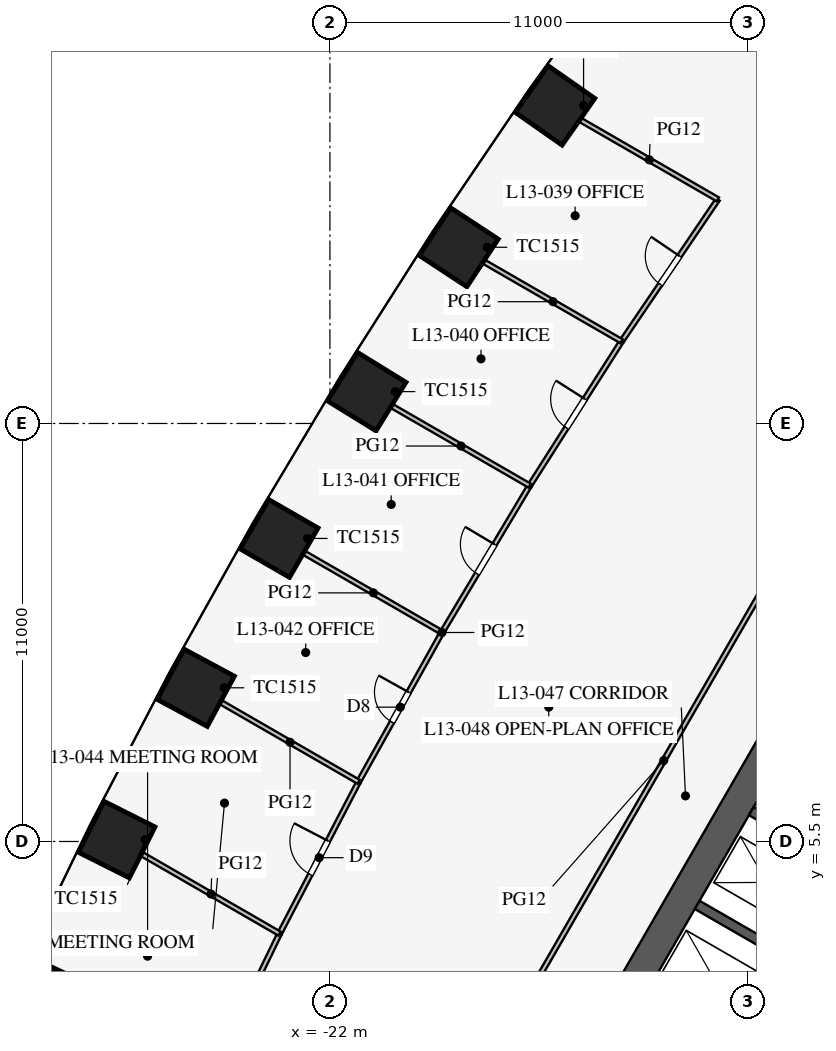
"""IFC4 building model, lengths in metres.
Left out: names, types, materials, properties, quantities, classifications, styles, units other than length and angle.
Written with IfcOpenShell. Run it as: python <this file> out.ifc"""

import sys

from ifc_helpers import new_model, si_unit, direction, frame, frame_2d, origin, origin_2d, place, context, subcontext, project, spatial, rectangle, extrude, element, fill, save


model = new_model("IFC4")
c1 = context("Model", 3, precision=1e-05, world=origin(), true_north=direction((0.0, 1.0)))
c2 = subcontext(c1, "Body", "Model", "MODEL_VIEW")
j1 = project(units=[si_unit("LENGTHUNIT", "METRE"), si_unit("PLANEANGLEUNIT", "RADIAN")], contexts=[c1])
p1 = place(None, origin())
s1 = spatial("IfcSite", under=j1, at=p1, CompositionType="ELEMENT")
p2 = place(p1, origin())
s2 = spatial("IfcBuilding", under=s1, at=p2, CompositionType="ELEMENT")
p3 = place(p2, frame((0.0, 0.0, 58.5)))
s3 = spatial("IfcBuildingStorey", under=s2, at=p3, CompositionType="ELEMENT", Elevation=58.5)
for number, where, z_axis, x_axis in (
    (1, (-16.076, 24.87, 0.0), (0.0, 0.0, 1.0), (-0.574, -0.819, 0.0)),
    (2, (-18.611, 21.137, 0.0), (0.0, 0.0, 1.0), (-0.549, -0.836, 0.0)),
    (3, (-21.031, 17.339, 0.0), (0.0, 0.0, 1.0), (-0.525, -0.851, 0.0)),
    (4, (-23.338, 13.474, 0.0), (0.0, 0.0, 1.0), (-0.5, -0.866, 0.0)),
    (5, (-25.531, 9.544, 0.0), (0.0, 0.0, 1.0), (-0.475, -0.88, 0.0)),
    (6, (-27.611, 5.549, 0.0), (0.0, 0.0, 1.0), (-0.449, -0.894, 0.0)),
    (7, (-29.576, 1.487, 0.0), (0.0, 0.0, 1.0), (-0.423, -0.906, 0.0)),
):
    element("IfcColumn", number, at=place(p3, frame(where, z_axis=z_axis, x_axis=x_axis)), inside=s3, PredefinedType="COLUMN", context=c2, shape_type="SweptSolid", body=[
        extrude(rectangle(XDim=1.5, YDim=1.5, at=origin_2d()), origin(), (0.0, 0.0, 1.0), 4.2),
    ])
p4 = place(p3, frame((-5.773, 16.0, 0.0), z_axis=(0.0, 0.0, 1.0), x_axis=(-0.500002442456, -0.866023993627, 0.0)))
e8 = element("IfcWall", 8, at=p4, inside=s3, PredefinedType="SHEAR", context=c2, shape_type="SweptSolid", body=[
    extrude(rectangle(XDim=21.939, YDim=0.8, at=frame_2d((10.97, 0.0))), origin(), (0.0, 0.0, 1.0), 4.2),
])
p5 = place(p4, frame((17.27, 0.0, 0.0)))
e9 = element("IfcOpeningElement", 9, at=p5, cuts=e8, PredefinedType="OPENING", context=c2, shape_type="SweptSolid", body=[
    extrude(rectangle(XDim=1.2, YDim=2.1, at=frame_2d((0.6, 1.05))), frame((0.0, 0.41, 0.0), z_axis=(0.0, -1.0, 0.0), x_axis=(1.0, 0.0, 0.0)), (0.0, 0.0, 1.0), 0.82),
])
p6 = place(p4, frame((3.47, 0.0, 0.0)))
e10 = element("IfcOpeningElement", 10, at=p6, cuts=e8, PredefinedType="OPENING", context=c2, shape_type="SweptSolid", body=[
    extrude(rectangle(XDim=1.2, YDim=2.1, at=frame_2d((0.6, 1.05))), frame((0.0, 0.41, 0.0), z_axis=(0.0, -1.0, 0.0), x_axis=(1.0, 0.0, 0.0)), (0.0, 0.0, 1.0), 0.82),
])
p7 = place(p3, frame((-5.724, 9.886, 0.0), z_axis=(0.0, 0.0, 1.0), x_axis=(-0.500001763848, -0.866024385424, 0.0)))
e11 = element("IfcWall", 11, at=p7, inside=s3, PredefinedType="SHEAR", context=c2, shape_type="SweptSolid", body=[
    extrude(rectangle(XDim=11.4, YDim=0.25, at=frame_2d((5.7, 0.0))), origin(), (0.0, 0.0, 1.0), 4.2),
])
p8 = place(p7, frame((6.525, 0.0, 0.0)))
e12 = element("IfcOpeningElement", 12, at=p8, cuts=e11, PredefinedType="OPENING", context=c2, shape_type="SweptSolid", body=[
    extrude(rectangle(XDim=1.2, YDim=2.2, at=frame_2d((0.6, 1.1))), frame((0.0, 0.135, 0.0), z_axis=(0.0, -1.0, 0.0), x_axis=(1.0, 0.0, 0.0)), (0.0, 0.0, 1.0), 0.27),
])
p9 = place(p7, frame((9.375, 0.0, 0.0)))
e13 = element("IfcOpeningElement", 13, at=p9, cuts=e11, PredefinedType="OPENING", context=c2, shape_type="SweptSolid", body=[
    extrude(rectangle(XDim=1.2, YDim=2.2, at=frame_2d((0.6, 1.1))), frame((0.0, 0.135, 0.0), z_axis=(0.0, -1.0, 0.0), x_axis=(1.0, 0.0, 0.0)), (0.0, 0.0, 1.0), 0.27),
])
for number, where, z_axis, x_axis in (
    (14, (-8.682, 5.012, 0.0), (0.0, 0.0, 1.0), (-0.866, 0.5, 0.0)),
    (15, (-10.107, 2.544, 0.0), (0.0, 0.0, 1.0), (-0.866, 0.5, 0.0)),
):
    element("IfcWall", number, at=place(p3, frame(where, z_axis=z_axis, x_axis=x_axis)), inside=s3, PredefinedType="SHEAR", context=c2, shape_type="SweptSolid", body=[
        extrude(rectangle(XDim=2.575, YDim=0.25, at=frame_2d((1.288, 0.0))), origin(), (0.0, 0.0, 1.0), 4.2),
    ])
p10 = place(p3, frame((-0.016, 30.491, 0.0), z_axis=(0.0, 0.0, 1.0), x_axis=(-0.50000091641, -0.866024874695, 0.0)))
e16 = element("IfcWall", 16, at=p10, inside=s3, PredefinedType="PARTITIONING", context=c2, shape_type="SweptSolid", body=[
    extrude(rectangle(XDim=52.796, YDim=0.12, at=frame_2d((26.398, 0.0))), origin(), (0.0, 0.0, 1.0), 2.9),
])
p11 = place(p10, frame((10.2, 0.0, 0.15)))
e17 = element("IfcOpeningElement", 17, at=p11, cuts=e16, PredefinedType="OPENING", context=c2, shape_type="SweptSolid", body=[
    extrude(rectangle(XDim=1.8, YDim=2.1, at=frame_2d((0.9, 1.05))), frame((0.0, 0.07, 0.0), z_axis=(0.0, -1.0, 0.0), x_axis=(1.0, 0.0, 0.0)), (0.0, 0.0, 1.0), 0.14),
])
p12 = place(p10, frame((40.8, 0.0, 0.15)))
e18 = element("IfcOpeningElement", 18, at=p12, cuts=e16, PredefinedType="OPENING", context=c2, shape_type="SweptSolid", body=[
    extrude(rectangle(XDim=1.8, YDim=2.1, at=frame_2d((0.9, 1.05))), frame((0.0, 0.07, 0.0), z_axis=(0.0, -1.0, 0.0), x_axis=(1.0, 0.0, 0.0)), (0.0, 0.0, 1.0), 0.14),
])
p13 = place(p3, frame((-19.052, 10.999, 0.0), z_axis=(0.0, 0.0, 1.0), x_axis=(-0.487373854787, -0.873193406795, 0.0)))
e19 = element("IfcWall", 19, at=p13, inside=s3, PredefinedType="PARTITIONING", context=c2, shape_type="SweptSolid", body=[
    extrude(rectangle(XDim=4.5, YDim=0.12, at=frame_2d((2.25, 0.0))), origin(), (0.0, 0.0, 1.0), 2.9),
])
p14 = place(p13, frame((1.8, 0.0, 0.15)))
e20 = element("IfcOpeningElement", 20, at=p14, cuts=e19, PredefinedType="OPENING", context=c2, shape_type="SweptSolid", body=[
    extrude(rectangle(XDim=0.9, YDim=2.1, at=frame_2d((0.45, 1.05))), frame((0.0, 0.07, 0.0), z_axis=(0.0, -1.0, 0.0), x_axis=(1.0, 0.0, 0.0)), (0.0, 0.0, 1.0), 0.14),
])
p15 = place(p3, frame((-21.245, 7.07, 0.0), z_axis=(0.0, 0.0, 1.0), x_axis=(-0.461852697957, -0.886956642339, 0.0)))
e21 = element("IfcWall", 21, at=p15, inside=s3, PredefinedType="PARTITIONING", context=c2, shape_type="SweptSolid", body=[
    extrude(rectangle(XDim=4.504, YDim=0.12, at=frame_2d((2.252, 0.0))), origin(), (0.0, 0.0, 1.0), 2.9),
])
p16 = place(p15, frame((1.75, 0.0, 0.15)))
e22 = element("IfcOpeningElement", 22, at=p16, cuts=e21, PredefinedType="OPENING", context=c2, shape_type="SweptSolid", body=[
    extrude(rectangle(XDim=1.0, YDim=2.1, at=frame_2d((0.5, 1.05))), frame((0.0, 0.07, 0.0), z_axis=(0.0, -1.0, 0.0), x_axis=(1.0, 0.0, 0.0)), (0.0, 0.0, 1.0), 0.14),
])
p17 = place(p3, frame((-23.325, 3.074, 0.0), z_axis=(0.0, 0.0, 1.0), x_axis=(-0.435857917556, -0.900015486369, 0.0)))
e23 = element("IfcWall", 23, at=p17, inside=s3, PredefinedType="PARTITIONING", context=c2, shape_type="SweptSolid", body=[
    extrude(rectangle(XDim=4.512, YDim=0.12, at=frame_2d((2.256, 0.0))), origin(), (0.0, 0.0, 1.0), 2.9),
])
p18 = place(p17, frame((1.75, 0.0, 0.15)))
e24 = element("IfcOpeningElement", 24, at=p18, cuts=e23, PredefinedType="OPENING", context=c2, shape_type="SweptSolid", body=[
    extrude(rectangle(XDim=1.0, YDim=2.1, at=frame_2d((0.5, 1.05))), frame((0.0, 0.07, 0.0), z_axis=(0.0, -1.0, 0.0), x_axis=(1.0, 0.0, 0.0)), (0.0, 0.0, 1.0), 0.14),
])
p19 = place(p3, frame((-11.792, 22.396, 0.0), z_axis=(0.0, 0.0, 1.0), x_axis=(-0.561512004239, -0.827468591002, 0.0)))
e25 = element("IfcWall", 25, at=p19, inside=s3, PredefinedType="PARTITIONING", context=c2, shape_type="SweptSolid", body=[
    extrude(rectangle(XDim=4.512, YDim=0.12, at=frame_2d((2.256, 0.0))), origin(), (0.0, 0.0, 1.0), 2.9),
])
p20 = place(p19, frame((1.8, 0.0, 0.15)))
e26 = element("IfcOpeningElement", 26, at=p20, cuts=e25, PredefinedType="OPENING", context=c2, shape_type="SweptSolid", body=[
    extrude(rectangle(XDim=0.9, YDim=2.1, at=frame_2d((0.45, 1.05))), frame((0.0, 0.07, 0.0), z_axis=(0.0, -1.0, 0.0), x_axis=(1.0, 0.0, 0.0)), (0.0, 0.0, 1.0), 0.14),
])
p21 = place(p3, frame((-16.745, 14.864, 0.0), z_axis=(0.0, 0.0, 1.0), x_axis=(-0.51252396108, -0.858672923364, 0.0)))
e27 = element("IfcWall", 27, at=p21, inside=s3, PredefinedType="PARTITIONING", context=c2, shape_type="SweptSolid", body=[
    extrude(rectangle(XDim=4.5, YDim=0.12, at=frame_2d((2.25, 0.0))), origin(), (0.0, 0.0, 1.0), 2.9),
])
p22 = place(p21, frame((1.8, 0.0, 0.15)))
e28 = element("IfcOpeningElement", 28, at=p22, cuts=e27, PredefinedType="OPENING", context=c2, shape_type="SweptSolid", body=[
    extrude(rectangle(XDim=0.9, YDim=2.1, at=frame_2d((0.45, 1.05))), frame((0.0, 0.07, 0.0), z_axis=(0.0, -1.0, 0.0), x_axis=(1.0, 0.0, 0.0)), (0.0, 0.0, 1.0), 0.14),
])
p23 = place(p3, frame((-14.325, 18.663, 0.0), z_axis=(0.0, 0.0, 1.0), x_axis=(-0.537205132487, -0.843451626135, 0.0)))
e29 = element("IfcWall", 29, at=p23, inside=s3, PredefinedType="PARTITIONING", context=c2, shape_type="SweptSolid", body=[
    extrude(rectangle(XDim=4.504, YDim=0.12, at=frame_2d((2.252, 0.0))), origin(), (0.0, 0.0, 1.0), 2.9),
])
p24 = place(p23, frame((1.8, 0.0, 0.15)))
e30 = element("IfcOpeningElement", 30, at=p24, cuts=e29, PredefinedType="OPENING", context=c2, shape_type="SweptSolid", body=[
    extrude(rectangle(XDim=0.9, YDim=2.1, at=frame_2d((0.45, 1.05))), frame((0.0, 0.07, 0.0), z_axis=(0.0, -1.0, 0.0), x_axis=(1.0, 0.0, 0.0)), (0.0, 0.0, 1.0), 0.14),
])
p25 = place(p3, frame((-19.052, 10.999, 0.0), z_axis=(0.0, 0.0, 1.0), x_axis=(-0.866004239599, 0.500036655653, 0.0)))
e31 = element("IfcWall", 31, at=p25, inside=s3, PredefinedType="PARTITIONING", context=c2, shape_type="SweptSolid", body=[
    extrude(rectangle(XDim=4.17, YDim=0.12, at=frame_2d((2.085, 0.0))), origin(), (0.0, 0.0, 1.0), 2.8),
])
p26 = place(p3, frame((-21.245, 7.07, 0.0), z_axis=(0.0, 0.0, 1.0), x_axis=(-0.866025669538, 0.499999539701, 0.0)))
e32 = element("IfcWall", 32, at=p26, inside=s3, PredefinedType="PARTITIONING", context=c2, shape_type="SweptSolid", body=[
    extrude(rectangle(XDim=4.169, YDim=0.12, at=frame_2d((2.085, 0.0))), origin(), (0.0, 0.0, 1.0), 2.8),
])
p27 = place(p3, frame((-23.325, 3.074, 0.0), z_axis=(0.0, 0.0, 1.0), x_axis=(-0.866009971343, 0.50002672882, 0.0)))
e33 = element("IfcWall", 33, at=p27, inside=s3, PredefinedType="PARTITIONING", context=c2, shape_type="SweptSolid", body=[
    extrude(rectangle(XDim=4.167, YDim=0.12, at=frame_2d((2.083, 0.0))), origin(), (0.0, 0.0, 1.0), 2.8),
])
p28 = place(p3, frame((-11.792, 22.396, 0.0), z_axis=(0.0, 0.0, 1.0), x_axis=(-0.866011781705, 0.500023593391, 0.0)))
e34 = element("IfcWall", 34, at=p28, inside=s3, PredefinedType="PARTITIONING", context=c2, shape_type="SweptSolid", body=[
    extrude(rectangle(XDim=4.164, YDim=0.12, at=frame_2d((2.082, 0.0))), origin(), (0.0, 0.0, 1.0), 2.6),
])
p29 = place(p3, frame((-16.745, 14.864, 0.0), z_axis=(0.0, 0.0, 1.0), x_axis=(-0.866025669538, 0.499999539701, 0.0)))
e35 = element("IfcWall", 35, at=p29, inside=s3, PredefinedType="PARTITIONING", context=c2, shape_type="SweptSolid", body=[
    extrude(rectangle(XDim=4.169, YDim=0.12, at=frame_2d((2.085, 0.0))), origin(), (0.0, 0.0, 1.0), 2.8),
])
p30 = place(p3, frame((-14.325, 18.663, 0.0), z_axis=(0.0, 0.0, 1.0), x_axis=(-0.866009971343, 0.50002672882, 0.0)))
e36 = element("IfcWall", 36, at=p30, inside=s3, PredefinedType="PARTITIONING", context=c2, shape_type="SweptSolid", body=[
    extrude(rectangle(XDim=4.167, YDim=0.12, at=frame_2d((2.083, 0.0))), origin(), (0.0, 0.0, 1.0), 2.8),
])
p31 = place(p20, frame((0.9, 0.0, 0.0), z_axis=(0.0, 0.0, 1.0), x_axis=(-1.0, 0.0, 0.0)))
e37 = element("IfcDoor", 37, at=p31, inside=s3, OperationType="SINGLE_SWING_RIGHT", PredefinedType="DOOR", context=c2, shape_type="SweptSolid", body=[
    extrude(rectangle(XDim=0.9, YDim=2.1, at=frame_2d((0.45, 1.05))), frame((0.0, 0.025, 0.0), z_axis=(0.0, -1.0, 0.0), x_axis=(1.0, 0.0, 0.0)), (0.0, 0.0, 1.0), 0.05),
])
fill(e26, e37)
p32 = place(p24, frame((0.9, 0.0, 0.0), z_axis=(0.0, 0.0, 1.0), x_axis=(-1.0, 0.0, 0.0)))
e38 = element("IfcDoor", 38, at=p32, inside=s3, OperationType="SINGLE_SWING_RIGHT", PredefinedType="DOOR", context=c2, shape_type="SweptSolid", body=[
    extrude(rectangle(XDim=0.9, YDim=2.1, at=frame_2d((0.45, 1.05))), frame((0.0, 0.025, 0.0), z_axis=(0.0, -1.0, 0.0), x_axis=(1.0, 0.0, 0.0)), (0.0, 0.0, 1.0), 0.05),
])
fill(e30, e38)
p33 = place(p22, frame((0.9, 0.0, 0.0), z_axis=(0.0, 0.0, 1.0), x_axis=(-1.0, 0.0, 0.0)))
e39 = element("IfcDoor", 39, at=p33, inside=s3, OperationType="SINGLE_SWING_RIGHT", PredefinedType="DOOR", context=c2, shape_type="SweptSolid", body=[
    extrude(rectangle(XDim=0.9, YDim=2.1, at=frame_2d((0.45, 1.05))), frame((0.0, 0.025, 0.0), z_axis=(0.0, -1.0, 0.0), x_axis=(1.0, 0.0, 0.0)), (0.0, 0.0, 1.0), 0.05),
])
fill(e28, e39)
p34 = place(p14, frame((0.9, 0.0, 0.0), z_axis=(0.0, 0.0, 1.0), x_axis=(-1.0, 0.0, 0.0)))
e40 = element("IfcDoor", 40, at=p34, inside=s3, OperationType="SINGLE_SWING_RIGHT", PredefinedType="DOOR", context=c2, shape_type="SweptSolid", body=[
    extrude(rectangle(XDim=0.9, YDim=2.1, at=frame_2d((0.45, 1.05))), frame((0.0, 0.025, 0.0), z_axis=(0.0, -1.0, 0.0), x_axis=(1.0, 0.0, 0.0)), (0.0, 0.0, 1.0), 0.05),
])
fill(e20, e40)
p35 = place(p16, frame((1.0, 0.0, 0.0), z_axis=(0.0, 0.0, 1.0), x_axis=(-1.0, 0.0, 0.0)))
e41 = element("IfcDoor", 41, at=p35, inside=s3, OperationType="SINGLE_SWING_RIGHT", PredefinedType="DOOR", context=c2, shape_type="SweptSolid", body=[
    extrude(rectangle(XDim=1.0, YDim=2.1, at=frame_2d((0.5, 1.05))), frame((0.0, 0.025, 0.0), z_axis=(0.0, -1.0, 0.0), x_axis=(1.0, 0.0, 0.0)), (0.0, 0.0, 1.0), 0.05),
])
fill(e22, e41)
save(model, sys.argv[1])
